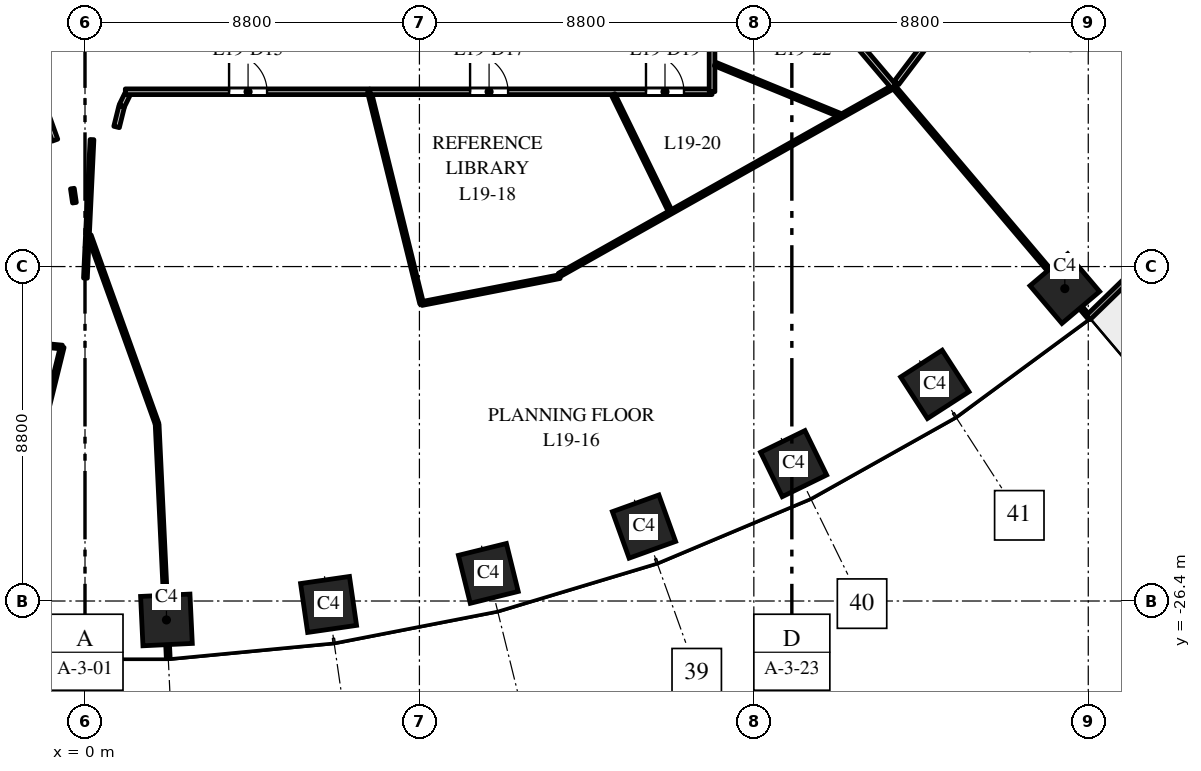
"""IFC4 building model, lengths in metres.
Left out: names, types, materials, properties, quantities, classifications, styles, units other than length and angle.
Written with IfcOpenShell. Run it as: python <this file> out.ifc"""

import sys

from ifc_helpers import new_model, si_unit, direction, frame, frame_2d, origin, origin_2d, place, context, subcontext, project, spatial, rectangle, extrude, element, fill, save


model = new_model("IFC4")
c1 = context("Model", 3, precision=1e-05, world=origin(), true_north=direction((0.0, 1.0)))
c2 = subcontext(c1, "Body", "Model", "MODEL_VIEW")
j1 = project(units=[si_unit("LENGTHUNIT", "METRE"), si_unit("PLANEANGLEUNIT", "RADIAN")], contexts=[c1])
p1 = place(None, origin())
s1 = spatial("IfcSite", under=j1, at=p1, CompositionType="ELEMENT")
p2 = place(p1, origin())
s2 = spatial("IfcBuilding", under=s1, at=p2, CompositionType="ELEMENT")
p3 = place(p2, frame((0.0, 0.0, 88.0)))
s3 = spatial("IfcBuildingStorey", under=s2, at=p3, CompositionType="ELEMENT", Elevation=88.0)
for number, where, z_axis, x_axis in (
    (1, (2.143, -26.898, 0.0), (0.0, 0.0, 1.0), (0.999, 0.048, 0.0)),
    (2, (6.409, -26.491, 0.0), (0.0, 0.0, 1.0), (0.99, 0.143, 0.0)),
    (3, (10.613, -25.674, 0.0), (0.0, 0.0, 1.0), (0.971, 0.24, 0.0)),
    (4, (14.709, -24.441, 0.0), (0.0, 0.0, 1.0), (0.941, 0.338, 0.0)),
    (5, (18.646, -22.785, 0.0), (0.0, 0.0, 1.0), (0.898, 0.439, 0.0)),
    (6, (22.362, -20.7, 0.0), (0.0, 0.0, 1.0), (0.84, 0.542, 0.0)),
    (7, (25.783, -18.18, 0.0), (0.0, 0.0, 1.0), (0.763, 0.646, 0.0)),
):
    element("IfcColumn", number, at=place(p3, frame(where, z_axis=z_axis, x_axis=x_axis)), inside=s3, PredefinedType="COLUMN", context=c2, shape_type="SweptSolid", body=[
        extrude(rectangle(XDim=1.3, YDim=1.3, at=origin_2d()), origin(), (0.0, 0.0, 1.0), 4.0),
    ])
p4 = place(p3, frame((26.396, -18.943, 0.0), z_axis=(0.0, 0.0, 1.0), x_axis=(0.717214761864, 0.696852197647, 0.0)))
e8 = element("IfcWall", 8, at=p4, inside=s3, PredefinedType="STANDARD", context=c2, shape_type="SweptSolid", body=[
    extrude(rectangle(XDim=4.424, YDim=0.15, at=frame_2d((2.212, 0.0))), origin(), (0.0, 0.0, 1.0), 3.7),
])
p5 = place(p4, frame((1.712, 0.0, 0.0)))
e9 = element("IfcOpeningElement", 9, at=p5, cuts=e8, PredefinedType="OPENING", context=c2, shape_type="SweptSolid", body=[
    extrude(rectangle(XDim=1.0, YDim=2.4, at=frame_2d((0.5, 1.2))), frame((0.0, 0.085, 0.0), z_axis=(0.0, -1.0, 0.0), x_axis=(1.0, 0.0, 0.0)), (0.0, 0.0, 1.0), 0.17),
])
p6 = place(p3, frame((-8.802, -18.932, 0.0), z_axis=(0.0, 0.0, 1.0), x_axis=(0.99543910623, -0.095399086939, 0.0)))
e10 = element("IfcWall", 10, at=p6, inside=s3, PredefinedType="PARTITIONING", context=c2, shape_type="SweptSolid", body=[
    extrude(rectangle(XDim=8.24, YDim=0.1, at=frame_2d((4.12, 0.0))), origin(), (0.0, 0.0, 1.0), 2.85),
])
p7 = place(p3, frame((-2.609, -27.858, 0.0), z_axis=(0.0, 0.0, 1.0), x_axis=(0.239677840558, 0.970852477334, 0.0)))
e11 = element("IfcWall", 11, at=p7, inside=s3, PredefinedType="PARTITIONING", context=c2, shape_type="SweptSolid", body=[
    extrude(rectangle(XDim=8.385, YDim=0.1, at=frame_2d((4.193, 0.0))), origin(), (0.0, 0.0, 1.0), 2.85),
])
p8 = place(p3, frame((-1.217, -13.079, 0.0), z_axis=(0.0, 0.0, 1.0), x_axis=(0.338140136535, -0.941095769868, 0.0)))
e12 = element("IfcWall", 12, at=p8, inside=s3, PredefinedType="PARTITIONING", context=c2, shape_type="SweptSolid", body=[
    extrude(rectangle(XDim=1.269, YDim=0.15, at=frame_2d((0.634, 0.0))), origin(), (0.0, 0.0, 1.0), 2.85),
])
p9 = place(p3, frame((-0.332, -15.548, 0.0), z_axis=(0.0, 0.0, 1.0), x_axis=(0.143604317757, -0.989635185269, 0.0)))
e13 = element("IfcWall", 13, at=p9, inside=s3, PredefinedType="PARTITIONING", context=c2, shape_type="SweptSolid", body=[
    extrude(rectangle(XDim=0.376, YDim=0.1, at=frame_2d((0.188, 0.0))), origin(), (0.0, 0.0, 1.0), 3.7),
])
p10 = place(p3, frame((0.011, -17.904, 0.0), z_axis=(0.0, 0.0, 1.0), x_axis=(0.046221474857, 0.998931216482, 0.0)))
e14 = element("IfcWall", 14, at=p10, inside=s3, PredefinedType="PARTITIONING", context=c2, shape_type="SweptSolid", body=[
    extrude(rectangle(XDim=0.803, YDim=0.1, at=frame_2d((0.401, 0.0))), origin(), (0.0, 0.0, 1.0), 3.7),
])
p11 = place(p3, frame((0.049, -17.087, 0.0), z_axis=(0.0, 0.0, 1.0), x_axis=(0.047688063475, 0.998862277094, 0.0)))
e15 = element("IfcWall", 15, at=p11, inside=s3, PredefinedType="PARTITIONING", context=c2, shape_type="SweptSolid", body=[
    extrude(rectangle(XDim=2.831, YDim=0.1, at=frame_2d((1.416, 0.0))), origin(), (0.0, 0.0, 1.0), 3.7),
])
p12 = place(p3, frame((0.113, -16.782, 0.0), z_axis=(0.0, 0.0, 1.0), x_axis=(0.338468220543, -0.940977823162, 0.0)))
e16 = element("IfcWall", 16, at=p12, inside=s3, PredefinedType="PARTITIONING", context=c2, shape_type="SweptSolid", body=[
    extrude(rectangle(XDim=5.265, YDim=0.1, at=frame_2d((2.632, 0.0))), origin(), (0.0, 0.0, 1.0), 3.7),
])
p13 = place(p3, frame((0.831, -13.927, 0.0), z_axis=(0.0, 0.0, 1.0), x_axis=(0.240473799965, 0.970655629732, 0.0)))
e17 = element("IfcWall", 17, at=p13, inside=s3, PredefinedType="PARTITIONING", context=c2, shape_type="SweptSolid", body=[
    extrude(rectangle(XDim=0.557, YDim=0.15, at=frame_2d((0.279, 0.0))), origin(), (0.0, 0.0, 1.0), 3.7),
])
p14 = place(p3, frame((0.969, -13.369, 0.0), z_axis=(0.0, 0.0, 1.0), x_axis=(0.440240923942, 0.897879685084, 0.0)))
e18 = element("IfcWall", 18, at=p14, inside=s3, PredefinedType="PARTITIONING", context=c2, shape_type="SweptSolid", body=[
    extrude(rectangle(XDim=0.323, YDim=0.15, at=frame_2d((0.161, 0.0))), origin(), (0.0, 0.0, 1.0), 3.7),
])
p15 = place(p3, frame((1.061, -13.0, 0.0), z_axis=(0.0, 0.0, 1.0), x_axis=(1.0, 0.0, 0.0)))
e19 = element("IfcWall", 19, at=p15, inside=s3, PredefinedType="PARTITIONING", context=c2, shape_type="SweptSolid", body=[
    extrude(rectangle(XDim=6.422, YDim=0.15, at=frame_2d((3.211, 0.0))), origin(), (0.0, 0.0, 1.0), 2.85),
])
p16 = place(p15, frame((2.73, 0.0, 0.0)))
e20 = element("IfcOpeningElement", 20, at=p16, cuts=e19, PredefinedType="OPENING", context=c2, shape_type="SweptSolid", body=[
    extrude(rectangle(XDim=1.0, YDim=2.1, at=frame_2d((0.5, 1.05))), frame((0.0, 0.085, 0.0), z_axis=(0.0, -1.0, 0.0), x_axis=(1.0, 0.0, 0.0)), (0.0, 0.0, 1.0), 0.17),
])
p17 = place(p3, frame((1.898, -21.75, 0.0), z_axis=(0.0, 0.0, 1.0), x_axis=(0.047440765919, -0.998874052986, 0.0)))
e21 = element("IfcWall", 21, at=p17, inside=s3, PredefinedType="PARTITIONING", context=c2, shape_type="SweptSolid", body=[
    extrude(rectangle(XDim=6.155, YDim=0.1, at=frame_2d((3.077, 0.0))), origin(), (0.0, 0.0, 1.0), 2.9),
])
p18 = place(p3, frame((7.483, -13.0, 0.0), z_axis=(0.0, 0.0, 1.0), x_axis=(0.239702552944, -0.970846376165, 0.0)))
e22 = element("IfcWall", 22, at=p18, inside=s3, PredefinedType="PARTITIONING", context=c2, shape_type="SweptSolid", body=[
    extrude(rectangle(XDim=5.74, YDim=0.1, at=frame_2d((2.87, 0.0))), origin(), (0.0, 0.0, 1.0), 3.7),
])
p19 = place(p3, frame((7.499, -13.0, 0.0), z_axis=(0.0, 0.0, 1.0), x_axis=(1.0, 0.0, 0.0)))
e23 = element("IfcWall", 23, at=p19, inside=s3, PredefinedType="PARTITIONING", context=c2, shape_type="SweptSolid", body=[
    extrude(rectangle(XDim=9.001, YDim=0.15, at=frame_2d((4.5, 0.0))), origin(), (0.0, 0.0, 1.0), 2.85),
])
p20 = place(p19, frame((2.634, 0.0, 0.0)))
e24 = element("IfcOpeningElement", 24, at=p20, cuts=e23, PredefinedType="OPENING", context=c2, shape_type="SweptSolid", body=[
    extrude(rectangle(XDim=1.0, YDim=2.1, at=frame_2d((0.5, 1.05))), frame((0.0, 0.085, 0.0), z_axis=(0.0, -1.0, 0.0), x_axis=(1.0, 0.0, 0.0)), (0.0, 0.0, 1.0), 0.17),
])
p21 = place(p19, frame((7.263, 0.0, 0.0)))
e25 = element("IfcOpeningElement", 25, at=p21, cuts=e23, PredefinedType="OPENING", context=c2, shape_type="SweptSolid", body=[
    extrude(rectangle(XDim=1.0, YDim=2.1, at=frame_2d((0.5, 1.05))), frame((0.0, 0.085, 0.0), z_axis=(0.0, -1.0, 0.0), x_axis=(1.0, 0.0, 0.0)), (0.0, 0.0, 1.0), 0.17),
])
p22 = place(p3, frame((8.859, -18.573, 0.0), z_axis=(0.0, 0.0, 1.0), x_axis=(0.981554610727, 0.191181971328, 0.0)))
e26 = element("IfcWall", 26, at=p22, inside=s3, PredefinedType="PARTITIONING", context=c2, shape_type="SweptSolid", body=[
    extrude(rectangle(XDim=3.703, YDim=0.1, at=frame_2d((1.852, 0.0))), origin(), (0.0, 0.0, 1.0), 2.85),
])
p23 = place(p3, frame((12.478, -17.822, 0.0), z_axis=(0.0, 0.0, 1.0), x_axis=(0.871366973315, 0.490631835306, 0.0)))
e27 = element("IfcWall", 27, at=p23, inside=s3, PredefinedType="PARTITIONING", context=c2, shape_type="SweptSolid", body=[
    extrude(rectangle(XDim=10.101, YDim=0.1, at=frame_2d((5.051, 0.0))), origin(), (0.0, 0.0, 1.0), 3.7),
])
p24 = place(p3, frame((13.899, -13.075, 0.0), z_axis=(0.0, 0.0, 1.0), x_axis=(0.439170148288, -0.898403907412, 0.0)))
e28 = element("IfcWall", 28, at=p24, inside=s3, PredefinedType="PARTITIONING", context=c2, shape_type="SweptSolid", body=[
    extrude(rectangle(XDim=3.395, YDim=0.1, at=frame_2d((1.698, 0.0))), origin(), (0.0, 0.0, 1.0), 3.7),
])
p25 = place(p3, frame((16.5, -13.0, 0.0), z_axis=(0.0, 0.0, 1.0), x_axis=(0.0, 1.0, 0.0)))
e29 = element("IfcWall", 29, at=p25, inside=s3, PredefinedType="PARTITIONING", context=c2, shape_type="SweptSolid", body=[
    extrude(rectangle(XDim=2.3, YDim=0.15, at=frame_2d((1.15, 0.0))), origin(), (0.0, 0.0, 1.0), 3.7),
])
p26 = place(p3, frame((16.579, -12.271, 0.0), z_axis=(0.0, 0.0, 1.0), x_axis=(0.925511782592, -0.378718814272, 0.0)))
e30 = element("IfcWall", 30, at=p26, inside=s3, PredefinedType="PARTITIONING", context=c2, shape_type="SweptSolid", body=[
    extrude(rectangle(XDim=3.539, YDim=0.1, at=frame_2d((1.769, 0.0))), origin(), (0.0, 0.0, 1.0), 3.7),
])
p27 = place(p3, frame((19.511, -10.778, 0.0), z_axis=(0.0, 0.0, 1.0), x_axis=(0.64641426768, -0.762986628021, 0.0)))
e31 = element("IfcWall", 31, at=p27, inside=s3, PredefinedType="PARTITIONING", context=c2, shape_type="SweptSolid", body=[
    extrude(rectangle(XDim=2.735, YDim=0.15, at=frame_2d((1.368, 0.0))), origin(), (0.0, 0.0, 1.0), 3.7),
])
p28 = place(p3, frame((21.355, -12.765, 0.0), z_axis=(0.0, 0.0, 1.0), x_axis=(0.603391001626, 0.797445483502, 0.0)))
e32 = element("IfcWall", 32, at=p28, inside=s3, PredefinedType="PARTITIONING", context=c2, shape_type="SweptSolid", body=[
    extrude(rectangle(XDim=2.68, YDim=0.15, at=frame_2d((1.34, 0.0))), origin(), (0.0, 0.0, 1.0), 2.75),
])
p29 = place(p3, frame((21.279, -12.865, 0.0), z_axis=(0.0, 0.0, 1.0), x_axis=(0.646395355102, -0.763002650652, 0.0)))
e33 = element("IfcWall", 33, at=p29, inside=s3, PredefinedType="PARTITIONING", context=c2, shape_type="SweptSolid", body=[
    extrude(rectangle(XDim=7.969, YDim=0.1, at=frame_2d((3.984, 0.0))), origin(), (0.0, 0.0, 1.0), 2.9),
])
p30 = place(p16, origin())
e34 = element("IfcDoor", 34, at=p30, inside=s3, OperationType="SINGLE_SWING_LEFT", PredefinedType="DOOR", context=c2, shape_type="SweptSolid", body=[
    extrude(rectangle(XDim=1.0, YDim=2.1, at=frame_2d((0.5, 1.05))), frame((0.0, 0.025, 0.0), z_axis=(0.0, -1.0, 0.0), x_axis=(1.0, 0.0, 0.0)), (0.0, 0.0, 1.0), 0.05),
])
fill(e20, e34)
p31 = place(p20, origin())
e35 = element("IfcDoor", 35, at=p31, inside=s3, OperationType="SINGLE_SWING_LEFT", PredefinedType="DOOR", context=c2, shape_type="SweptSolid", body=[
    extrude(rectangle(XDim=1.0, YDim=2.1, at=frame_2d((0.5, 1.05))), frame((0.0, 0.025, 0.0), z_axis=(0.0, -1.0, 0.0), x_axis=(1.0, 0.0, 0.0)), (0.0, 0.0, 1.0), 0.05),
])
fill(e24, e35)
p32 = place(p21, origin())
e36 = element("IfcDoor", 36, at=p32, inside=s3, OperationType="SINGLE_SWING_LEFT", PredefinedType="DOOR", context=c2, shape_type="SweptSolid", body=[
    extrude(rectangle(XDim=1.0, YDim=2.1, at=frame_2d((0.5, 1.05))), frame((0.0, 0.025, 0.0), z_axis=(0.0, -1.0, 0.0), x_axis=(1.0, 0.0, 0.0)), (0.0, 0.0, 1.0), 0.05),
])
fill(e25, e36)
save(model, sys.argv[1])
